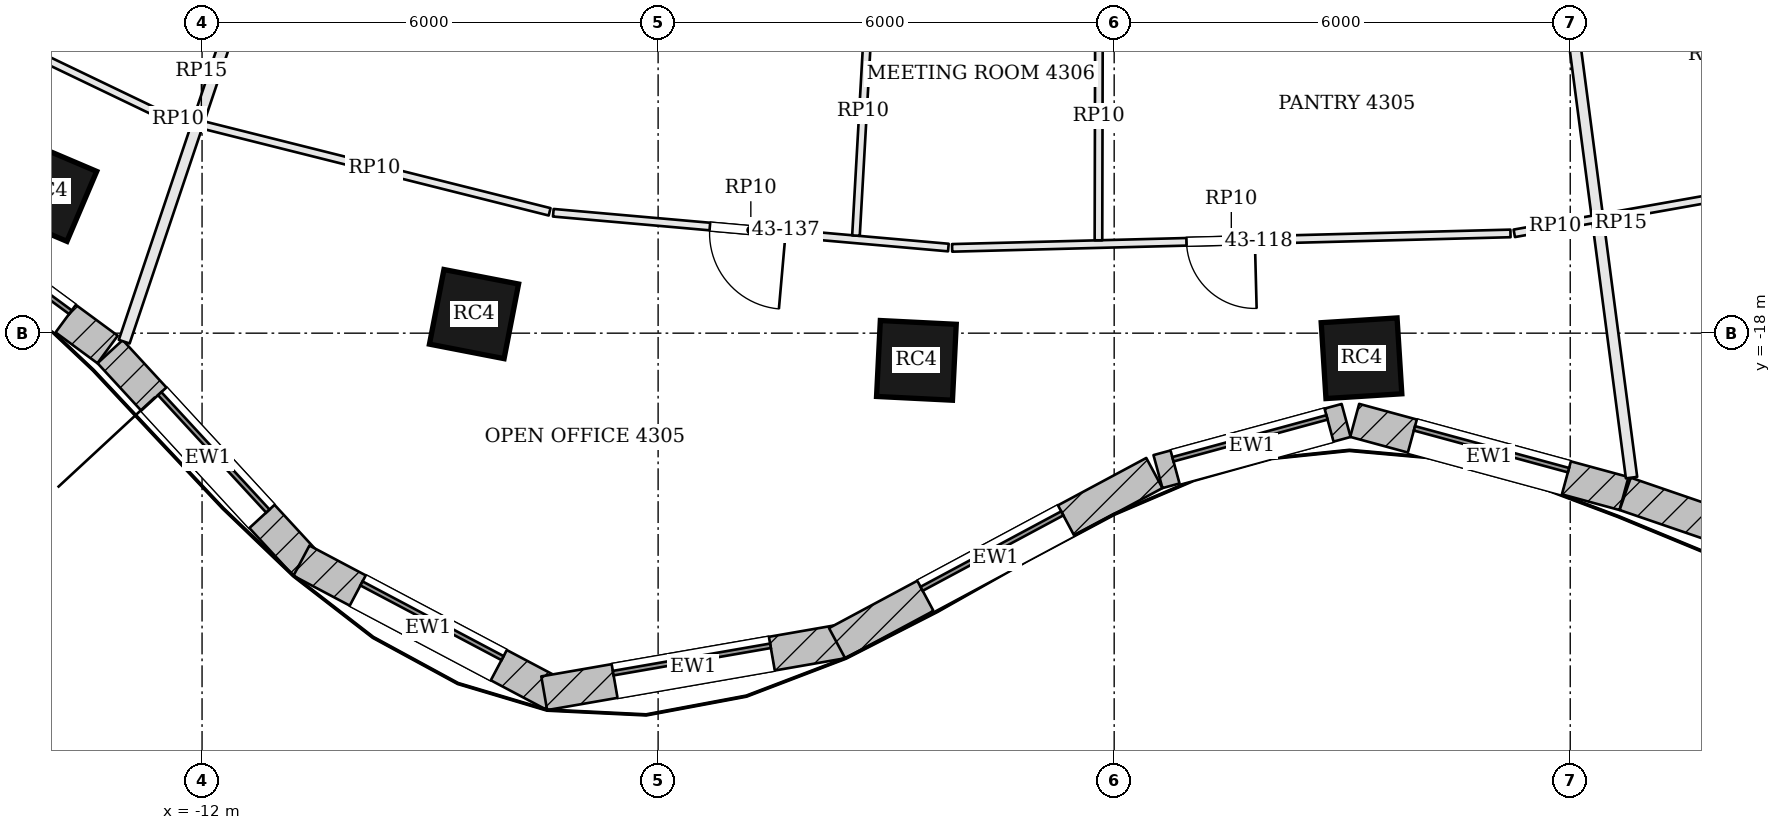
"""IFC4 building model, lengths in metres.
Left out: names, types, materials, properties, quantities, classifications, styles, units other than length and angle.
Written with IfcOpenShell. Run it as: python <this file> out.ifc"""

import sys

from ifc_helpers import new_model, si_unit, direction, frame, frame_2d, origin, origin_2d, place, context, subcontext, project, spatial, rectangle, extrude, element, fill, save


model = new_model("IFC4")
c1 = context("Model", 3, precision=1e-05, world=origin(), true_north=direction((0.0, 1.0)))
c2 = subcontext(c1, "Body", "Model", "MODEL_VIEW")
j1 = project(units=[si_unit("LENGTHUNIT", "METRE"), si_unit("PLANEANGLEUNIT", "RADIAN")], contexts=[c1])
p1 = place(None, origin())
s1 = spatial("IfcSite", under=j1, at=p1, CompositionType="ELEMENT")
p2 = place(p1, origin())
s2 = spatial("IfcBuilding", under=s1, at=p2, CompositionType="ELEMENT")
p3 = place(p2, frame((0.0, 0.0, 177.9)))
s3 = spatial("IfcBuildingStorey", under=s2, at=p3, CompositionType="ELEMENT", Elevation=177.9)
for number, where, z_axis, x_axis in (
    (1, (-14.042, -16.136, 0.0), (0.0, 0.0, 1.0), (0.92, -0.392, 0.0)),
    (2, (-8.422, -17.749, 0.0), (0.0, 0.0, 1.0), (0.982, -0.191, 0.0)),
    (3, (-2.602, -18.358, 0.0), (0.0, 0.0, 1.0), (0.999, -0.05, 0.0)),
    (4, (3.254, -18.33, 0.0), (0.0, 0.0, 1.0), (0.998, 0.063, 0.0)),
):
    element("IfcColumn", number, at=place(p3, frame(where, z_axis=z_axis, x_axis=x_axis)), inside=s3, PredefinedType="COLUMN", context=c2, shape_type="SweptSolid", body=[
        extrude(rectangle(XDim=1.0, YDim=1.0, at=origin_2d()), origin(), (0.0, 0.0, 1.0), 3.9),
    ])
p4 = place(p3, frame((-16.036, -16.158, 0.0), z_axis=(0.0, 0.0, 1.0), x_axis=(0.805181432967, -0.593028549064, 0.0)))
e5 = element("IfcWall", 5, at=p4, inside=s3, PredefinedType="SOLIDWALL", context=c2, shape_type="SweptSolid", body=[
    extrude(rectangle(XDim=3.469, YDim=0.45, at=frame_2d((1.734, 0.0))), origin(), (0.0, 0.0, 1.0), 3.7),
])
p5 = place(p4, frame((0.684, 0.0, 0.9)))
e6 = element("IfcOpeningElement", 6, at=p5, cuts=e5, PredefinedType="OPENING", context=c2, shape_type="SweptSolid", body=[
    extrude(rectangle(XDim=2.1, YDim=2.3, at=frame_2d((1.05, 1.15))), frame((0.0, 0.235, 0.0), z_axis=(0.0, -1.0, 0.0), x_axis=(1.0, 0.0, 0.0)), (0.0, 0.0, 1.0), 0.47),
])
p6 = place(p3, frame((-13.209, -18.243, 0.0), z_axis=(0.0, 0.0, 1.0), x_axis=(0.677612152497, -0.735419452278, 0.0)))
e7 = element("IfcWall", 7, at=p6, inside=s3, PredefinedType="SOLIDWALL", context=c2, shape_type="SweptSolid", body=[
    extrude(rectangle(XDim=3.797, YDim=0.45, at=frame_2d((1.898, 0.0))), origin(), (0.0, 0.0, 1.0), 3.7),
])
p7 = place(p6, frame((0.848, 0.0, 0.9)))
e8 = element("IfcOpeningElement", 8, at=p7, cuts=e7, PredefinedType="OPENING", context=c2, shape_type="SweptSolid", body=[
    extrude(rectangle(XDim=2.1, YDim=2.3, at=frame_2d((1.05, 1.15))), frame((0.0, 0.235, 0.0), z_axis=(0.0, -1.0, 0.0), x_axis=(1.0, 0.0, 0.0)), (0.0, 0.0, 1.0), 0.47),
])
p8 = place(p3, frame((-10.693, -20.993, 0.0), z_axis=(0.0, 0.0, 1.0), x_axis=(0.883817790726, -0.46783128668, 0.0)))
e9 = element("IfcWall", 9, at=p8, inside=s3, PredefinedType="SOLIDWALL", context=c2, shape_type="SweptSolid", body=[
    extrude(rectangle(XDim=3.777, YDim=0.45, at=frame_2d((1.888, 0.0))), origin(), (0.0, 0.0, 1.0), 3.7),
])
p9 = place(p8, frame((0.838, 0.0, 0.9)))
e10 = element("IfcOpeningElement", 10, at=p9, cuts=e9, PredefinedType="OPENING", context=c2, shape_type="SweptSolid", body=[
    extrude(rectangle(XDim=2.1, YDim=2.3, at=frame_2d((1.05, 1.15))), frame((0.0, 0.235, 0.0), z_axis=(0.0, -1.0, 0.0), x_axis=(1.0, 0.0, 0.0)), (0.0, 0.0, 1.0), 0.47),
])
p10 = place(p3, frame((-7.499, -22.737, 0.0), z_axis=(0.0, 0.0, 1.0), x_axis=(0.98521220506, 0.171338585849, 0.0)))
e11 = element("IfcWall", 11, at=p10, inside=s3, PredefinedType="SOLIDWALL", context=c2, shape_type="SweptSolid", body=[
    extrude(rectangle(XDim=3.98, YDim=0.45, at=frame_2d((1.99, 0.0))), origin(), (0.0, 0.0, 1.0), 3.7),
])
p11 = place(p10, frame((0.94, 0.0, 0.9)))
e12 = element("IfcOpeningElement", 12, at=p11, cuts=e11, PredefinedType="OPENING", context=c2, shape_type="SweptSolid", body=[
    extrude(rectangle(XDim=2.1, YDim=2.3, at=frame_2d((1.05, 1.15))), frame((0.0, 0.235, 0.0), z_axis=(0.0, -1.0, 0.0), x_axis=(1.0, 0.0, 0.0)), (0.0, 0.0, 1.0), 0.47),
])
p12 = place(p3, frame((-3.646, -22.079, 0.0), z_axis=(0.0, 0.0, 1.0), x_axis=(0.881279133897, 0.472596115259, 0.0)))
e13 = element("IfcWall", 13, at=p12, inside=s3, PredefinedType="SOLIDWALL", context=c2, shape_type="SweptSolid", body=[
    extrude(rectangle(XDim=4.737, YDim=0.45, at=frame_2d((2.368, 0.0))), origin(), (0.0, 0.0, 1.0), 3.7),
])
p13 = place(p12, frame((1.318, 0.0, 0.9)))
e14 = element("IfcOpeningElement", 14, at=p13, cuts=e13, PredefinedType="OPENING", context=c2, shape_type="SweptSolid", body=[
    extrude(rectangle(XDim=2.1, YDim=2.3, at=frame_2d((1.05, 1.15))), frame((0.0, 0.235, 0.0), z_axis=(0.0, -1.0, 0.0), x_axis=(1.0, 0.0, 0.0)), (0.0, 0.0, 1.0), 0.47),
])
p14 = place(p3, frame((0.576, -19.821, 0.0), z_axis=(0.0, 0.0, 1.0), x_axis=(0.965009398019, 0.262215296532, 0.0)))
e15 = element("IfcWall", 15, at=p14, inside=s3, PredefinedType="SOLIDWALL", context=c2, shape_type="SweptSolid", body=[
    extrude(rectangle(XDim=2.565, YDim=0.45, at=frame_2d((1.283, 0.0))), origin(), (0.0, 0.0, 1.0), 3.7),
])
p15 = place(p14, frame((0.233, 0.0, 0.9)))
e16 = element("IfcOpeningElement", 16, at=p15, cuts=e15, PredefinedType="OPENING", context=c2, shape_type="SweptSolid", body=[
    extrude(rectangle(XDim=2.1, YDim=2.3, at=frame_2d((1.05, 1.15))), frame((0.0, 0.235, 0.0), z_axis=(0.0, -1.0, 0.0), x_axis=(1.0, 0.0, 0.0)), (0.0, 0.0, 1.0), 0.47),
])
p16 = place(p3, frame((3.164, -19.147, 0.0), z_axis=(0.0, 0.0, 1.0), x_axis=(0.965039479998, -0.262104563191, 0.0)))
e17 = element("IfcWall", 17, at=p16, inside=s3, PredefinedType="SOLIDWALL", context=c2, shape_type="SweptSolid", body=[
    extrude(rectangle(XDim=3.672, YDim=0.45, at=frame_2d((1.836, 0.0))), origin(), (0.0, 0.0, 1.0), 3.7),
])
p17 = place(p16, frame((0.786, 0.0, 0.9)))
e18 = element("IfcOpeningElement", 18, at=p17, cuts=e17, PredefinedType="OPENING", context=c2, shape_type="SweptSolid", body=[
    extrude(rectangle(XDim=2.1, YDim=2.3, at=frame_2d((1.05, 1.15))), frame((0.0, 0.235, 0.0), z_axis=(0.0, -1.0, 0.0), x_axis=(1.0, 0.0, 0.0)), (0.0, 0.0, 1.0), 0.47),
])
p18 = place(p3, frame((6.723, -20.114, 0.0), z_axis=(0.0, 0.0, 1.0), x_axis=(0.945947299026, -0.324320377815, 0.0)))
e19 = element("IfcWall", 19, at=p18, inside=s3, PredefinedType="SOLIDWALL", context=c2, shape_type="SweptSolid", body=[
    extrude(rectangle(XDim=4.745, YDim=0.45, at=frame_2d((2.372, 0.0))), origin(), (0.0, 0.0, 1.0), 3.7),
])
p19 = place(p18, frame((1.322, 0.0, 0.9)))
e20 = element("IfcOpeningElement", 20, at=p19, cuts=e19, PredefinedType="OPENING", context=c2, shape_type="SweptSolid", body=[
    extrude(rectangle(XDim=2.1, YDim=2.3, at=frame_2d((1.05, 1.15))), frame((0.0, 0.235, 0.0), z_axis=(0.0, -1.0, 0.0), x_axis=(1.0, 0.0, 0.0)), (0.0, 0.0, 1.0), 0.47),
])
p20 = place(p3, frame((-13.024, -18.112, 0.0), z_axis=(0.0, 0.0, 1.0), x_axis=(0.319081027508, 0.947727438605, 0.0)))
e21 = element("IfcWall", 21, at=p20, inside=s3, PredefinedType="PARTITIONING", context=c2, shape_type="SweptSolid", body=[
    extrude(rectangle(XDim=6.363, YDim=0.15, at=frame_2d((3.181, 0.0))), origin(), (0.0, 0.0, 1.0), 3.234),
])
p21 = place(p3, frame((6.807, -19.901, 0.0), z_axis=(0.0, 0.0, 1.0), x_axis=(-0.129934596003, 0.991522566945, 0.0)))
e22 = element("IfcWall", 22, at=p21, inside=s3, PredefinedType="PARTITIONING", context=c2, shape_type="SweptSolid", body=[
    extrude(rectangle(XDim=6.766, YDim=0.15, at=frame_2d((3.383, 0.0))), origin(), (0.0, 0.0, 1.0), 3.234),
])
p22 = place(p3, frame((-12.078, -15.238, 0.0), z_axis=(0.0, 0.0, 1.0), x_axis=(-0.970024978464, 0.243005228658, 0.0)))
e23 = element("IfcWall", 23, at=p22, inside=s3, PredefinedType="PARTITIONING", context=c2, shape_type="SweptSolid", body=[
    extrude(rectangle(XDim=0.489, YDim=0.1, at=frame_2d((0.245, 0.0))), origin(), (0.0, 0.0, 1.0), 3.084),
])
p23 = place(p3, frame((-12.597, -15.098, 0.0), z_axis=(0.0, 0.0, 1.0), x_axis=(-0.901514437286, 0.432749025839, 0.0)))
e24 = element("IfcWall", 24, at=p23, inside=s3, PredefinedType="PARTITIONING", context=c2, shape_type="SweptSolid", body=[
    extrude(rectangle(XDim=4.42, YDim=0.1, at=frame_2d((2.21, 0.0))), origin(), (0.0, 0.0, 1.0), 3.084),
])
p24 = place(p3, frame((6.34, -16.496, 0.0), z_axis=(0.0, 0.0, 1.0), x_axis=(-0.984632558058, -0.174638843366, 0.0)))
e25 = element("IfcWall", 25, at=p24, inside=s3, PredefinedType="PARTITIONING", context=c2, shape_type="SweptSolid", body=[
    extrude(rectangle(XDim=1.093, YDim=0.1, at=frame_2d((0.547, 0.0))), origin(), (0.0, 0.0, 1.0), 3.084),
])
p25 = place(p3, frame((5.214, -16.688, 0.0), z_axis=(0.0, 0.0, 1.0), x_axis=(-0.999664981446, -0.025882906921, 0.0)))
e26 = element("IfcWall", 26, at=p25, inside=s3, PredefinedType="PARTITIONING", context=c2, shape_type="SweptSolid", body=[
    extrude(rectangle(XDim=7.348, YDim=0.1, at=frame_2d((3.674, 0.0))), origin(), (0.0, 0.0, 1.0), 3.084),
])
p26 = place(p25, frame((3.364, 0.0, 0.0)))
e27 = element("IfcOpeningElement", 27, at=p26, cuts=e26, PredefinedType="OPENING", context=c2, shape_type="SweptSolid", body=[
    extrude(rectangle(XDim=0.9, YDim=2.1, at=frame_2d((0.45, 1.05))), frame((0.0, 0.06, 0.0), z_axis=(0.0, -1.0, 0.0), x_axis=(1.0, 0.0, 0.0)), (0.0, 0.0, 1.0), 0.12),
])
p27 = place(p3, frame((-2.181, -16.874, 0.0), z_axis=(0.0, 0.0, 1.0), x_axis=(-0.996143934904, 0.087734035321, 0.0)))
e28 = element("IfcWall", 28, at=p27, inside=s3, PredefinedType="PARTITIONING", context=c2, shape_type="SweptSolid", body=[
    extrude(rectangle(XDim=5.218, YDim=0.1, at=frame_2d((2.609, 0.0))), origin(), (0.0, 0.0, 1.0), 3.084),
])
p28 = place(p27, frame((2.15, 0.0, 0.0)))
e29 = element("IfcOpeningElement", 29, at=p28, cuts=e28, PredefinedType="OPENING", context=c2, shape_type="SweptSolid", body=[
    extrude(rectangle(XDim=1.0, YDim=2.1, at=frame_2d((0.5, 1.05))), frame((0.0, 0.06, 0.0), z_axis=(0.0, -1.0, 0.0), x_axis=(1.0, 0.0, 0.0)), (0.0, 0.0, 1.0), 0.12),
])
p29 = place(p3, frame((-7.427, -16.404, 0.0), z_axis=(0.0, 0.0, 1.0), x_axis=(-0.970009433409, 0.243067272783, 0.0)))
e30 = element("IfcWall", 30, at=p29, inside=s3, PredefinedType="PARTITIONING", context=c2, shape_type="SweptSolid", body=[
    extrude(rectangle(XDim=4.754, YDim=0.1, at=frame_2d((2.377, 0.0))), origin(), (0.0, 0.0, 1.0), 3.084),
])
p30 = place(p3, frame((-3.211, -13.445, 0.0), z_axis=(0.0, 0.0, 1.0), x_axis=(-0.056703901856, -0.99839103938, 0.0)))
e31 = element("IfcWall", 31, at=p30, inside=s3, PredefinedType="PARTITIONING", context=c2, shape_type="SweptSolid", body=[
    extrude(rectangle(XDim=3.277, YDim=0.1, at=frame_2d((1.638, 0.0))), origin(), (0.0, 0.0, 1.0), 3.084),
])
p31 = place(p3, frame((-0.199, -13.502, 0.0), z_axis=(0.0, 0.0, 1.0), x_axis=(-0.002309978934, -0.999997331995, 0.0)))
e32 = element("IfcWall", 32, at=p31, inside=s3, PredefinedType="PARTITIONING", context=c2, shape_type="SweptSolid", body=[
    extrude(rectangle(XDim=3.276, YDim=0.1, at=frame_2d((1.638, 0.0))), origin(), (0.0, 0.0, 1.0), 3.084),
])
p32 = place(p3, frame((10.441, -15.769, 0.0), z_axis=(0.0, 0.0, 1.0), x_axis=(-0.984637220861, -0.174612551941, 0.0)))
e33 = element("IfcWall", 33, at=p32, inside=s3, PredefinedType="PARTITIONING", context=c2, shape_type="SweptSolid", body=[
    extrude(rectangle(XDim=4.125, YDim=0.1, at=frame_2d((2.062, 0.0))), origin(), (0.0, 0.0, 1.0), 3.084),
])
p33 = place(p5, origin())
e34 = element("IfcWindow", 34, at=p33, inside=s3, PartitioningType="SINGLE_PANEL", PredefinedType="WINDOW", context=c2, shape_type="SweptSolid", body=[
    extrude(rectangle(XDim=2.1, YDim=2.3, at=frame_2d((1.05, 1.15))), frame((0.0, 0.135, 0.0), z_axis=(0.0, -1.0, 0.0), x_axis=(1.0, 0.0, 0.0)), (0.0, 0.0, 1.0), 0.06),
])
fill(e6, e34)
p34 = place(p7, origin())
e35 = element("IfcWindow", 35, at=p34, inside=s3, PartitioningType="SINGLE_PANEL", PredefinedType="WINDOW", context=c2, shape_type="SweptSolid", body=[
    extrude(rectangle(XDim=2.1, YDim=2.3, at=frame_2d((1.05, 1.15))), frame((0.0, 0.135, 0.0), z_axis=(0.0, -1.0, 0.0), x_axis=(1.0, 0.0, 0.0)), (0.0, 0.0, 1.0), 0.06),
])
fill(e8, e35)
p35 = place(p9, origin())
e36 = element("IfcWindow", 36, at=p35, inside=s3, PartitioningType="SINGLE_PANEL", PredefinedType="WINDOW", context=c2, shape_type="SweptSolid", body=[
    extrude(rectangle(XDim=2.1, YDim=2.3, at=frame_2d((1.05, 1.15))), frame((0.0, 0.135, 0.0), z_axis=(0.0, -1.0, 0.0), x_axis=(1.0, 0.0, 0.0)), (0.0, 0.0, 1.0), 0.06),
])
fill(e10, e36)
p36 = place(p11, origin())
e37 = element("IfcWindow", 37, at=p36, inside=s3, PartitioningType="SINGLE_PANEL", PredefinedType="WINDOW", context=c2, shape_type="SweptSolid", body=[
    extrude(rectangle(XDim=2.1, YDim=2.3, at=frame_2d((1.05, 1.15))), frame((0.0, 0.135, 0.0), z_axis=(0.0, -1.0, 0.0), x_axis=(1.0, 0.0, 0.0)), (0.0, 0.0, 1.0), 0.06),
])
fill(e12, e37)
p37 = place(p13, origin())
e38 = element("IfcWindow", 38, at=p37, inside=s3, PartitioningType="SINGLE_PANEL", PredefinedType="WINDOW", context=c2, shape_type="SweptSolid", body=[
    extrude(rectangle(XDim=2.1, YDim=2.3, at=frame_2d((1.05, 1.15))), frame((0.0, 0.135, 0.0), z_axis=(0.0, -1.0, 0.0), x_axis=(1.0, 0.0, 0.0)), (0.0, 0.0, 1.0), 0.06),
])
fill(e14, e38)
p38 = place(p15, origin())
e39 = element("IfcWindow", 39, at=p38, inside=s3, PartitioningType="SINGLE_PANEL", PredefinedType="WINDOW", context=c2, shape_type="SweptSolid", body=[
    extrude(rectangle(XDim=2.1, YDim=2.3, at=frame_2d((1.05, 1.15))), frame((0.0, 0.135, 0.0), z_axis=(0.0, -1.0, 0.0), x_axis=(1.0, 0.0, 0.0)), (0.0, 0.0, 1.0), 0.06),
])
fill(e16, e39)
p39 = place(p17, origin())
e40 = element("IfcWindow", 40, at=p39, inside=s3, PartitioningType="SINGLE_PANEL", PredefinedType="WINDOW", context=c2, shape_type="SweptSolid", body=[
    extrude(rectangle(XDim=2.1, YDim=2.3, at=frame_2d((1.05, 1.15))), frame((0.0, 0.135, 0.0), z_axis=(0.0, -1.0, 0.0), x_axis=(1.0, 0.0, 0.0)), (0.0, 0.0, 1.0), 0.06),
])
fill(e18, e40)
p40 = place(p26, origin())
e41 = element("IfcDoor", 41, at=p40, inside=s3, OperationType="SINGLE_SWING_LEFT", PredefinedType="DOOR", context=c2, shape_type="SweptSolid", body=[
    extrude(rectangle(XDim=0.9, YDim=2.1, at=frame_2d((0.45, 1.05))), frame((0.0, 0.025, 0.0), z_axis=(0.0, -1.0, 0.0), x_axis=(1.0, 0.0, 0.0)), (0.0, 0.0, 1.0), 0.05),
])
fill(e27, e41)
p41 = place(p28, origin())
e42 = element("IfcDoor", 42, at=p41, inside=s3, OperationType="SINGLE_SWING_LEFT", PredefinedType="DOOR", context=c2, shape_type="SweptSolid", body=[
    extrude(rectangle(XDim=1.0, YDim=2.1, at=frame_2d((0.5, 1.05))), frame((0.0, 0.025, 0.0), z_axis=(0.0, -1.0, 0.0), x_axis=(1.0, 0.0, 0.0)), (0.0, 0.0, 1.0), 0.05),
])
fill(e29, e42)
save(model, sys.argv[1])
